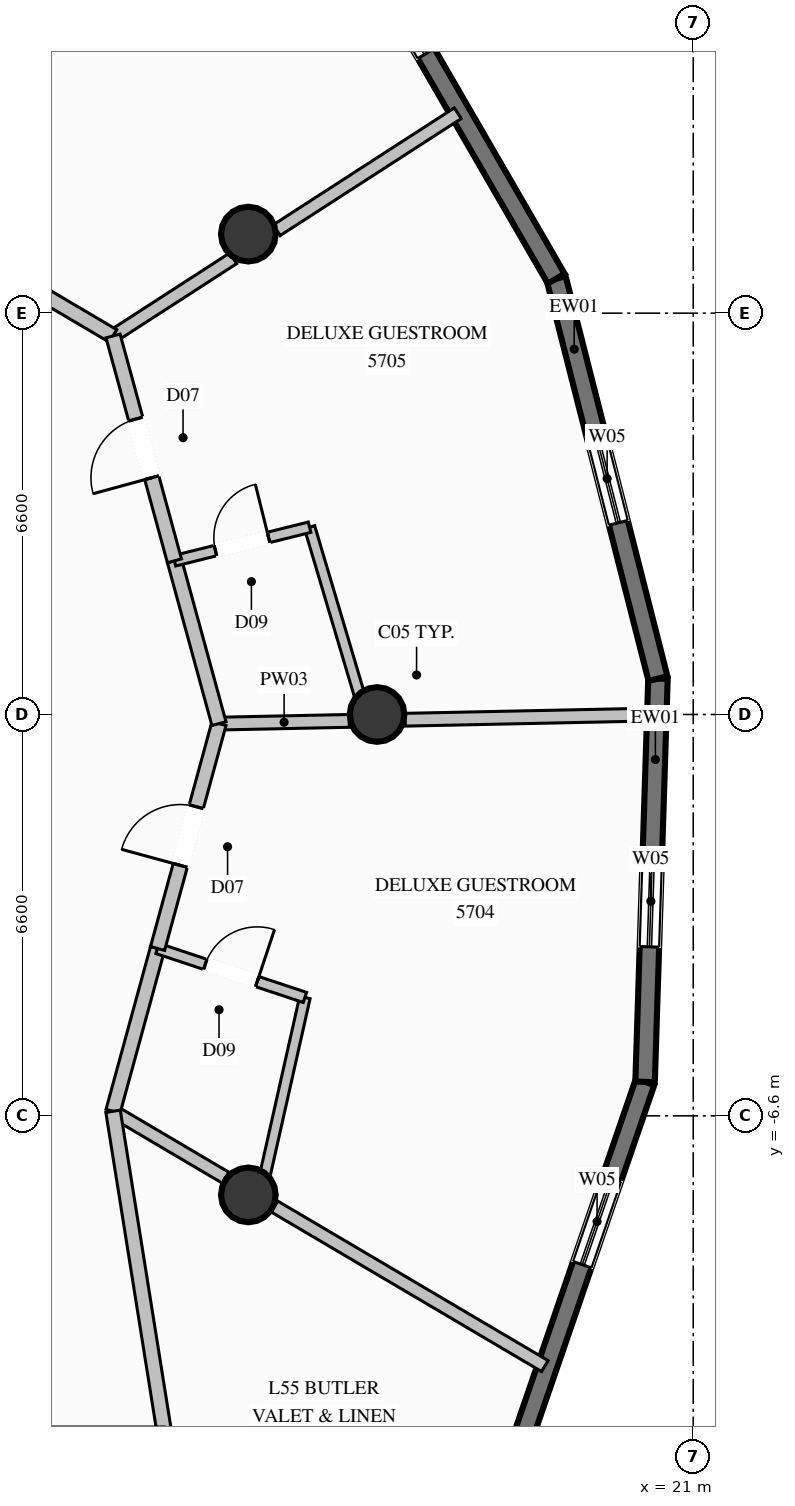
"""IFC4 building model, lengths in metres.
Left out: names, types, materials, properties, quantities, classifications, styles, units other than length and angle.
Written with IfcOpenShell. Run it as: python <this file> out.ifc"""

import sys

from ifc_helpers import new_model, si_unit, direction, frame, frame_2d, origin, origin_2d, place, context, subcontext, project, spatial, rectangle, circle, extrude, element, fill, save


model = new_model("IFC4")
c1 = context("Model", 3, precision=1e-05, world=origin(), true_north=direction((0.0, 1.0)))
c2 = subcontext(c1, "Body", "Model", "MODEL_VIEW")
j1 = project(units=[si_unit("LENGTHUNIT", "METRE"), si_unit("PLANEANGLEUNIT", "RADIAN")], contexts=[c1])
p1 = place(None, origin())
s1 = spatial("IfcSite", under=j1, at=p1, CompositionType="ELEMENT")
p2 = place(p1, origin())
s2 = spatial("IfcBuilding", under=s1, at=p2, CompositionType="ELEMENT")
p3 = place(p2, frame((0.0, 0.0, 212.8)))
s3 = spatial("IfcBuildingStorey", under=s2, at=p3, CompositionType="ELEMENT", Elevation=212.8)
for number, where, z_axis, x_axis in (
    (1, (15.8, 0.0, 0.0), (0.0, 0.0, 1.0), (1.0, 0.0, 0.0)),
    (2, (13.683, 7.9, 0.0), (0.0, 0.0, 1.0), (1.0, 0.0, 0.0)),
    (3, (13.683, -7.9, 0.0), (0.0, 0.0, 1.0), (1.0, 0.0, 0.0)),
):
    element("IfcColumn", number, at=place(p3, frame(where, z_axis=z_axis, x_axis=x_axis)), inside=s3, PredefinedType="COLUMN", context=c2, shape_type="SweptSolid", body=[
        extrude(circle(Radius=0.45, at=origin_2d()), origin(), (0.0, 0.0, 1.0), 3.6),
    ])
p4 = place(p3, frame((20.208, -6.042, 0.0), z_axis=(0.0, 0.0, 1.0), x_axis=(-0.325246353844, -0.94562931919, 0.0)))
e4 = element("IfcWall", 4, at=p4, inside=s3, PredefinedType="SOLIDWALL", context=c2, shape_type="SweptSolid", body=[
    extrude(rectangle(XDim=6.389, YDim=0.32, at=frame_2d((3.195, 0.0))), origin(), (0.0, 0.0, 1.0), 3.36),
])
p5 = place(p4, frame((1.678, 0.0, 0.85)))
e5 = element("IfcOpeningElement", 5, at=p5, cuts=e4, PredefinedType="OPENING", context=c2, shape_type="SweptSolid", body=[
    extrude(rectangle(XDim=1.5, YDim=1.2, at=frame_2d((0.75, 0.6))), frame((0.0, 0.17, 0.0), z_axis=(0.0, -1.0, 0.0), x_axis=(1.0, 0.0, 0.0)), (0.0, 0.0, 1.0), 0.34),
])
p6 = place(p3, frame((20.42, 0.591, 0.0), z_axis=(0.0, 0.0, 1.0), x_axis=(-0.031931884173, -0.999490047361, 0.0)))
e6 = element("IfcWall", 6, at=p6, inside=s3, PredefinedType="SOLIDWALL", context=c2, shape_type="SweptSolid", body=[
    extrude(rectangle(XDim=6.636, YDim=0.32, at=frame_2d((3.318, 0.0))), origin(), (0.0, 0.0, 1.0), 3.36),
])
p7 = place(p6, frame((2.914, 0.0, 0.85)))
e7 = element("IfcOpeningElement", 7, at=p7, cuts=e6, PredefinedType="OPENING", context=c2, shape_type="SweptSolid", body=[
    extrude(rectangle(XDim=1.5, YDim=1.2, at=frame_2d((0.75, 0.6))), frame((0.0, 0.17, 0.0), z_axis=(0.0, -1.0, 0.0), x_axis=(1.0, 0.0, 0.0)), (0.0, 0.0, 1.0), 0.34),
])
p8 = place(p3, frame((18.747, 7.167, 0.0), z_axis=(0.0, 0.0, 1.0), x_axis=(0.246537970171, -0.969133132889, 0.0)))
e8 = element("IfcWall", 8, at=p8, inside=s3, PredefinedType="SOLIDWALL", context=c2, shape_type="SweptSolid", body=[
    extrude(rectangle(XDim=6.785, YDim=0.32, at=frame_2d((3.393, 0.0))), origin(), (0.0, 0.0, 1.0), 3.36),
])
p9 = place(p8, frame((2.643, 0.0, 0.85)))
e9 = element("IfcOpeningElement", 9, at=p9, cuts=e8, PredefinedType="OPENING", context=c2, shape_type="SweptSolid", body=[
    extrude(rectangle(XDim=1.5, YDim=1.2, at=frame_2d((0.75, 0.6))), frame((0.0, 0.17, 0.0), z_axis=(0.0, -1.0, 0.0), x_axis=(1.0, 0.0, 0.0)), (0.0, 0.0, 1.0), 0.34),
])
p10 = place(p3, frame((15.35, 13.041, 0.0), z_axis=(0.0, 0.0, 1.0), x_axis=(0.50061923795, -0.865667591281, 0.0)))
e10 = element("IfcWall", 10, at=p10, inside=s3, PredefinedType="SOLIDWALL", context=c2, shape_type="SweptSolid", body=[
    extrude(rectangle(XDim=6.786, YDim=0.32, at=frame_2d((3.393, 0.0))), origin(), (0.0, 0.0, 1.0), 3.36),
])
p11 = place(p10, frame((1.01, 0.0, 0.85)))
e11 = element("IfcOpeningElement", 11, at=p11, cuts=e10, PredefinedType="OPENING", context=c2, shape_type="SweptSolid", body=[
    extrude(rectangle(XDim=1.5, YDim=1.2, at=frame_2d((0.75, 0.6))), frame((0.0, 0.17, 0.0), z_axis=(0.0, -1.0, 0.0), x_axis=(1.0, 0.0, 0.0)), (0.0, 0.0, 1.0), 0.34),
])
p12 = place(p3, frame((13.2, -0.15, 0.0), z_axis=(0.0, 0.0, 1.0), x_axis=(0.999780180016, 0.020966440976, 0.0)))
e12 = element("IfcWall", 12, at=p12, inside=s3, PredefinedType="PARTITIONING", context=c2, shape_type="SweptSolid", body=[
    extrude(rectangle(XDim=2.143, YDim=0.21, at=frame_2d((1.071, 0.0))), origin(), (0.0, 0.0, 1.0), 3.36),
])
p13 = place(p3, frame((16.262, -0.086, 0.0), z_axis=(0.0, 0.0, 1.0), x_axis=(0.999780309739, 0.02096025426, 0.0)))
e13 = element("IfcWall", 13, at=p13, inside=s3, PredefinedType="PARTITIONING", context=c2, shape_type="SweptSolid", body=[
    extrude(rectangle(XDim=4.1, YDim=0.21, at=frame_2d((2.05, 0.0))), origin(), (0.0, 0.0, 1.0), 3.36),
])
p14 = place(p3, frame((11.458, 6.225, 0.0), z_axis=(0.0, 0.0, 1.0), x_axis=(0.839915213044, 0.542717638278, 0.0)))
e14 = element("IfcWall", 14, at=p14, inside=s3, PredefinedType="PARTITIONING", context=c2, shape_type="SweptSolid", body=[
    extrude(rectangle(XDim=2.353, YDim=0.21, at=frame_2d((1.176, 0.0))), origin(), (0.0, 0.0, 1.0), 2.876),
])
p15 = place(p3, frame((14.149, 7.964, 0.0), z_axis=(0.0, 0.0, 1.0), x_axis=(0.839972682267, 0.542628688004, 0.0)))
e15 = element("IfcWall", 15, at=p15, inside=s3, PredefinedType="PARTITIONING", context=c2, shape_type="SweptSolid", body=[
    extrude(rectangle(XDim=3.545, YDim=0.21, at=frame_2d((1.773, 0.0))), origin(), (0.0, 0.0, 1.0), 3.36),
])
p16 = place(p3, frame((11.458, -6.525, 0.0), z_axis=(0.0, 0.0, 1.0), x_axis=(0.86117076556, -0.508315760669, 0.0)))
e16 = element("IfcWall", 16, at=p16, inside=s3, PredefinedType="PARTITIONING", context=c2, shape_type="SweptSolid", body=[
    extrude(rectangle(XDim=2.148, YDim=0.21, at=frame_2d((1.074, 0.0))), origin(), (0.0, 0.0, 1.0), 2.876),
])
p17 = place(p3, frame((14.112, -8.091, 0.0), z_axis=(0.0, 0.0, 1.0), x_axis=(0.861245459465, -0.508189195626, 0.0)))
e17 = element("IfcWall", 17, at=p17, inside=s3, PredefinedType="PARTITIONING", context=c2, shape_type="SweptSolid", body=[
    extrude(rectangle(XDim=5.164, YDim=0.21, at=frame_2d((2.582, 0.0))), origin(), (0.0, 0.0, 1.0), 3.36),
])
p18 = place(p3, frame((7.35, 8.65, 0.0), z_axis=(0.0, 0.0, 1.0), x_axis=(0.861164858472, -0.508325768118, 0.0)))
e18 = element("IfcWall", 18, at=p18, inside=s3, PredefinedType="PARTITIONING", context=c2, shape_type="SweptSolid", body=[
    extrude(rectangle(XDim=4.77, YDim=0.24, at=frame_2d((2.385, 0.0))), origin(), (0.0, 0.0, 1.0), 3.36),
])
p19 = place(p18, frame((1.885, 0.0, 0.0)))
e19 = element("IfcOpeningElement", 19, at=p19, cuts=e18, PredefinedType="OPENING", context=c2, shape_type="SweptSolid", body=[
    extrude(rectangle(XDim=1.0, YDim=2.2, at=frame_2d((0.5, 1.1))), frame((0.0, 0.13, 0.0), z_axis=(0.0, -1.0, 0.0), x_axis=(1.0, 0.0, 0.0)), (0.0, 0.0, 1.0), 0.26),
])
p20 = place(p3, frame((11.458, -6.525, 0.0), z_axis=(0.0, 0.0, 1.0), x_axis=(0.263735174528, 0.964595126318, 0.0)))
e20 = element("IfcWall", 20, at=p20, inside=s3, PredefinedType="PARTITIONING", context=c2, shape_type="SweptSolid", body=[
    extrude(rectangle(XDim=2.775, YDim=0.24, at=frame_2d((1.388, 0.0))), origin(), (0.0, 0.0, 1.0), 3.36),
])
p21 = place(p3, frame((13.872, -7.95, 0.0), z_axis=(0.0, 0.0, 1.0), x_axis=(0.21927837601, 0.975662335962, 0.0)))
e21 = element("IfcWall", 21, at=p21, inside=s3, PredefinedType="PLUMBINGWALL", context=c2, shape_type="SweptSolid", body=[
    extrude(rectangle(XDim=3.379, YDim=0.175, at=frame_2d((1.689, 0.0))), origin(), (0.0, 0.0, 1.0), 2.929),
])
p22 = place(p3, frame((12.19, -3.848, 0.0), z_axis=(0.0, 0.0, 1.0), x_axis=(0.948979287938, -0.315338407216, 0.0)))
e22 = element("IfcWall", 22, at=p22, inside=s3, PredefinedType="PLUMBINGWALL", context=c2, shape_type="SweptSolid", body=[
    extrude(rectangle(XDim=2.553, YDim=0.175, at=frame_2d((1.277, 0.0))), origin(), (0.0, 0.0, 1.0), 3.36),
])
p23 = place(p22, frame((0.827, 0.0, 0.0)))
e23 = element("IfcOpeningElement", 23, at=p23, cuts=e22, PredefinedType="OPENING", context=c2, shape_type="SweptSolid", body=[
    extrude(rectangle(XDim=0.9, YDim=2.1, at=frame_2d((0.45, 1.05))), frame((0.0, 0.098, 0.0), z_axis=(0.0, -1.0, 0.0), x_axis=(1.0, 0.0, 0.0)), (0.0, 0.0, 1.0), 0.195),
])
p24 = place(p3, frame((12.19, -3.848, 0.0), z_axis=(0.0, 0.0, 1.0), x_axis=(0.263473055226, 0.964666755502, 0.0)))
e24 = element("IfcWall", 24, at=p24, inside=s3, PredefinedType="PARTITIONING", context=c2, shape_type="SweptSolid", body=[
    extrude(rectangle(XDim=3.833, YDim=0.24, at=frame_2d((1.917, 0.0))), origin(), (0.0, 0.0, 1.0), 3.36),
])
p25 = place(p24, frame((1.417, 0.0, 0.0)))
e25 = element("IfcOpeningElement", 25, at=p25, cuts=e24, PredefinedType="OPENING", context=c2, shape_type="SweptSolid", body=[
    extrude(rectangle(XDim=1.0, YDim=2.2, at=frame_2d((0.5, 1.1))), frame((0.0, 0.13, 0.0), z_axis=(0.0, -1.0, 0.0), x_axis=(1.0, 0.0, 0.0)), (0.0, 0.0, 1.0), 0.26),
])
p26 = place(p3, frame((13.2, -0.15, 0.0), z_axis=(0.0, 0.0, 1.0), x_axis=(-0.263735174528, 0.964595126318, 0.0)))
e26 = element("IfcWall", 26, at=p26, inside=s3, PredefinedType="PARTITIONING", context=c2, shape_type="SweptSolid", body=[
    extrude(rectangle(XDim=2.775, YDim=0.24, at=frame_2d((1.388, 0.0))), origin(), (0.0, 0.0, 1.0), 3.36),
])
p27 = place(p3, frame((15.635, -0.099, 0.0), z_axis=(0.0, 0.0, 1.0), x_axis=(-0.284942849617, 0.958544507288, 0.0)))
e27 = element("IfcWall", 27, at=p27, inside=s3, PredefinedType="PLUMBINGWALL", context=c2, shape_type="SweptSolid", body=[
    extrude(rectangle(XDim=3.317, YDim=0.175, at=frame_2d((1.658, 0.0))), origin(), (0.0, 0.0, 1.0), 2.929),
])
p28 = place(p3, frame((12.468, 2.527, 0.0), z_axis=(0.0, 0.0, 1.0), x_axis=(0.970399110564, 0.241506865776, 0.0)))
e28 = element("IfcWall", 28, at=p28, inside=s3, PredefinedType="PLUMBINGWALL", context=c2, shape_type="SweptSolid", body=[
    extrude(rectangle(XDim=2.29, YDim=0.175, at=frame_2d((1.145, 0.0))), origin(), (0.0, 0.0, 1.0), 3.36),
])
p29 = place(p28, frame((0.695, 0.0, 0.0)))
e29 = element("IfcOpeningElement", 29, at=p29, cuts=e28, PredefinedType="OPENING", context=c2, shape_type="SweptSolid", body=[
    extrude(rectangle(XDim=0.9, YDim=2.1, at=frame_2d((0.45, 1.05))), frame((0.0, 0.098, 0.0), z_axis=(0.0, -1.0, 0.0), x_axis=(1.0, 0.0, 0.0)), (0.0, 0.0, 1.0), 0.195),
])
p30 = place(p3, frame((12.468, 2.527, 0.0), z_axis=(0.0, 0.0, 1.0), x_axis=(-0.263473055226, 0.964666755502, 0.0)))
e30 = element("IfcWall", 30, at=p30, inside=s3, PredefinedType="PARTITIONING", context=c2, shape_type="SweptSolid", body=[
    extrude(rectangle(XDim=3.833, YDim=0.24, at=frame_2d((1.917, 0.0))), origin(), (0.0, 0.0, 1.0), 3.36),
])
p31 = place(p30, frame((1.417, 0.0, 0.0)))
e31 = element("IfcOpeningElement", 31, at=p31, cuts=e30, PredefinedType="OPENING", context=c2, shape_type="SweptSolid", body=[
    extrude(rectangle(XDim=1.0, YDim=2.2, at=frame_2d((0.5, 1.1))), frame((0.0, 0.13, 0.0), z_axis=(0.0, -1.0, 0.0), x_axis=(1.0, 0.0, 0.0)), (0.0, 0.0, 1.0), 0.26),
])
p32 = place(p3, frame((12.3, -11.8, 0.0), z_axis=(0.0, 0.0, 1.0), x_axis=(-0.157628647668, 0.987498460472, 0.0)))
e32 = element("IfcWall", 32, at=p32, inside=s3, PredefinedType="PARTITIONING", context=c2, shape_type="SweptSolid", body=[
    extrude(rectangle(XDim=5.342, YDim=0.24, at=frame_2d((2.671, 0.0))), origin(), (0.0, 0.0, 1.0), 3.36),
])
p33 = place(p5, origin())
e33 = element("IfcWindow", 33, at=p33, inside=s3, PartitioningType="SINGLE_PANEL", PredefinedType="WINDOW", context=c2, shape_type="SweptSolid", body=[
    extrude(rectangle(XDim=1.5, YDim=1.2, at=frame_2d((0.75, 0.6))), frame((0.0, 0.03, 0.0), z_axis=(0.0, -1.0, 0.0), x_axis=(1.0, 0.0, 0.0)), (0.0, 0.0, 1.0), 0.06),
])
fill(e5, e33)
p34 = place(p7, origin())
e34 = element("IfcWindow", 34, at=p34, inside=s3, PartitioningType="SINGLE_PANEL", PredefinedType="WINDOW", context=c2, shape_type="SweptSolid", body=[
    extrude(rectangle(XDim=1.5, YDim=1.2, at=frame_2d((0.75, 0.6))), frame((0.0, 0.03, 0.0), z_axis=(0.0, -1.0, 0.0), x_axis=(1.0, 0.0, 0.0)), (0.0, 0.0, 1.0), 0.06),
])
fill(e7, e34)
p35 = place(p9, origin())
e35 = element("IfcWindow", 35, at=p35, inside=s3, PartitioningType="SINGLE_PANEL", PredefinedType="WINDOW", context=c2, shape_type="SweptSolid", body=[
    extrude(rectangle(XDim=1.5, YDim=1.2, at=frame_2d((0.75, 0.6))), frame((0.0, 0.03, 0.0), z_axis=(0.0, -1.0, 0.0), x_axis=(1.0, 0.0, 0.0)), (0.0, 0.0, 1.0), 0.06),
])
fill(e9, e35)
p36 = place(p11, origin())
e36 = element("IfcWindow", 36, at=p36, inside=s3, PartitioningType="SINGLE_PANEL", PredefinedType="WINDOW", context=c2, shape_type="SweptSolid", body=[
    extrude(rectangle(XDim=1.5, YDim=1.2, at=frame_2d((0.75, 0.6))), frame((0.0, 0.03, 0.0), z_axis=(0.0, -1.0, 0.0), x_axis=(1.0, 0.0, 0.0)), (0.0, 0.0, 1.0), 0.06),
])
fill(e11, e36)
p37 = place(p23, origin())
e37 = element("IfcDoor", 37, at=p37, inside=s3, OperationType="SINGLE_SWING_RIGHT", PredefinedType="DOOR", context=c2, shape_type="SweptSolid", body=[
    extrude(rectangle(XDim=0.9, YDim=2.1, at=frame_2d((0.45, 1.05))), frame((0.0, 0.025, 0.0), z_axis=(0.0, -1.0, 0.0), x_axis=(1.0, 0.0, 0.0)), (0.0, 0.0, 1.0), 0.05),
])
fill(e23, e37)
p38 = place(p25, origin())
e38 = element("IfcDoor", 38, at=p38, inside=s3, OperationType="SINGLE_SWING_LEFT", PredefinedType="DOOR", context=c2, shape_type="SweptSolid", body=[
    extrude(rectangle(XDim=1.0, YDim=2.2, at=frame_2d((0.5, 1.1))), frame((0.0, 0.025, 0.0), z_axis=(0.0, -1.0, 0.0), x_axis=(1.0, 0.0, 0.0)), (0.0, 0.0, 1.0), 0.05),
])
fill(e25, e38)
p39 = place(p29, origin())
e39 = element("IfcDoor", 39, at=p39, inside=s3, OperationType="SINGLE_SWING_RIGHT", PredefinedType="DOOR", context=c2, shape_type="SweptSolid", body=[
    extrude(rectangle(XDim=0.9, YDim=2.1, at=frame_2d((0.45, 1.05))), frame((0.0, 0.025, 0.0), z_axis=(0.0, -1.0, 0.0), x_axis=(1.0, 0.0, 0.0)), (0.0, 0.0, 1.0), 0.05),
])
fill(e29, e39)
p40 = place(p31, origin())
e40 = element("IfcDoor", 40, at=p40, inside=s3, OperationType="SINGLE_SWING_LEFT", PredefinedType="DOOR", context=c2, shape_type="SweptSolid", body=[
    extrude(rectangle(XDim=1.0, YDim=2.2, at=frame_2d((0.5, 1.1))), frame((0.0, 0.025, 0.0), z_axis=(0.0, -1.0, 0.0), x_axis=(1.0, 0.0, 0.0)), (0.0, 0.0, 1.0), 0.05),
])
fill(e31, e40)
save(model, sys.argv[1])
